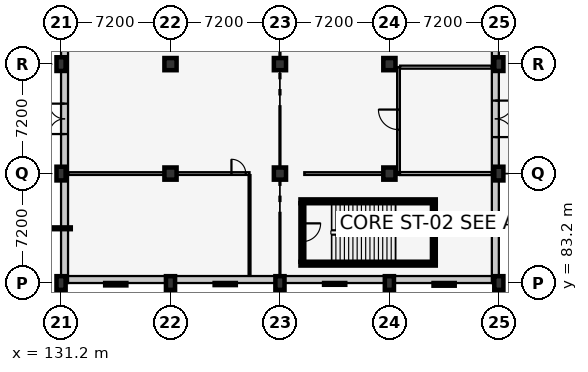
"""IFC4 building model, lengths in metres.
Left out: names, types, materials, properties, quantities, classifications, styles, units other than length and angle.
Written with IfcOpenShell. Run it as: python <this file> out.ifc"""

import sys

from ifc_helpers import new_model, si_unit, direction, frame, frame_2d, origin, origin_2d, place, context, subcontext, project, spatial, rectangle, extrude, element, fill, save


model = new_model("IFC4")
c1 = context("Model", 3, precision=1e-05, world=origin(), true_north=direction((0.0, 1.0)))
c2 = subcontext(c1, "Body", "Model", "MODEL_VIEW")
j1 = project(units=[si_unit("LENGTHUNIT", "METRE"), si_unit("PLANEANGLEUNIT", "RADIAN")], contexts=[c1])
p1 = place(None, origin())
s1 = spatial("IfcSite", under=j1, at=p1, CompositionType="ELEMENT")
p2 = place(p1, origin())
s2 = spatial("IfcBuilding", under=s1, at=p2, CompositionType="ELEMENT")
p3 = place(p2, origin())
s3 = spatial("IfcBuildingStorey", under=s2, at=p3, CompositionType="ELEMENT", Elevation=0.0)
for number, where, z_axis, x_axis in (
    (1, (131.2, 83.2, 0.0), (0.0, 0.0, 1.0), (1.0, 0.0, 0.0)),
    (2, (131.2, 90.4, 0.0), (0.0, 0.0, 1.0), (1.0, 0.0, 0.0)),
    (3, (131.2, 97.6, 0.0), (0.0, 0.0, 1.0), (1.0, 0.0, 0.0)),
    (4, (138.4, 83.2, 0.0), (0.0, 0.0, 1.0), (1.0, 0.0, 0.0)),
):
    element("IfcColumn", number, at=place(p3, frame(where, z_axis=z_axis, x_axis=x_axis)), inside=s3, PredefinedType="COLUMN", context=c2, shape_type="SweptSolid", body=[
        extrude(rectangle(XDim=0.6, YDim=0.9, at=origin_2d()), origin(), (0.0, 0.0, 1.0), 5.4),
    ])
for number, where, z_axis, x_axis in (
    (5, (138.4, 90.4, 0.0), (0.0, 0.0, 1.0), (1.0, 0.0, 0.0)),
    (6, (138.4, 97.6, 0.0), (0.0, 0.0, 1.0), (1.0, 0.0, 0.0)),
):
    element("IfcColumn", number, at=place(p3, frame(where, z_axis=z_axis, x_axis=x_axis)), inside=s3, PredefinedType="COLUMN", context=c2, shape_type="SweptSolid", body=[
        extrude(rectangle(XDim=0.8, YDim=0.8, at=origin_2d()), origin(), (0.0, 0.0, 1.0), 5.4),
    ])
p4 = place(p3, frame((145.6, 83.2, 0.0), z_axis=(0.0, 0.0, 1.0), x_axis=(1.0, 0.0, 0.0)))
e7 = element("IfcColumn", 7, at=p4, inside=s3, PredefinedType="COLUMN", context=c2, shape_type="SweptSolid", body=[
    extrude(rectangle(XDim=0.6, YDim=0.9, at=origin_2d()), origin(), (0.0, 0.0, 1.0), 5.4),
])
for number, where, z_axis, x_axis in (
    (8, (145.6, 90.4, 0.0), (0.0, 0.0, 1.0), (1.0, 0.0, 0.0)),
    (9, (145.6, 97.6, 0.0), (0.0, 0.0, 1.0), (1.0, 0.0, 0.0)),
):
    element("IfcColumn", number, at=place(p3, frame(where, z_axis=z_axis, x_axis=x_axis)), inside=s3, PredefinedType="COLUMN", context=c2, shape_type="SweptSolid", body=[
        extrude(rectangle(XDim=0.8, YDim=0.8, at=origin_2d()), origin(), (0.0, 0.0, 1.0), 5.4),
    ])
p5 = place(p3, frame((152.8, 83.2, 0.0), z_axis=(0.0, 0.0, 1.0), x_axis=(1.0, 0.0, 0.0)))
e10 = element("IfcColumn", 10, at=p5, inside=s3, PredefinedType="COLUMN", context=c2, shape_type="SweptSolid", body=[
    extrude(rectangle(XDim=0.6, YDim=0.9, at=origin_2d()), origin(), (0.0, 0.0, 1.0), 5.4),
])
for number, where, z_axis, x_axis in (
    (11, (152.8, 90.4, 0.0), (0.0, 0.0, 1.0), (1.0, 0.0, 0.0)),
    (12, (152.8, 97.6, 0.0), (0.0, 0.0, 1.0), (1.0, 0.0, 0.0)),
):
    element("IfcColumn", number, at=place(p3, frame(where, z_axis=z_axis, x_axis=x_axis)), inside=s3, PredefinedType="COLUMN", context=c2, shape_type="SweptSolid", body=[
        extrude(rectangle(XDim=0.8, YDim=0.8, at=origin_2d()), origin(), (0.0, 0.0, 1.0), 5.4),
    ])
for number, where, z_axis, x_axis in (
    (13, (160.0, 83.2, 0.0), (0.0, 0.0, 1.0), (1.0, 0.0, 0.0)),
    (14, (160.0, 90.4, 0.0), (0.0, 0.0, 1.0), (1.0, 0.0, 0.0)),
    (15, (160.0, 97.6, 0.0), (0.0, 0.0, 1.0), (1.0, 0.0, 0.0)),
):
    element("IfcColumn", number, at=place(p3, frame(where, z_axis=z_axis, x_axis=x_axis)), inside=s3, PredefinedType="COLUMN", context=c2, shape_type="SweptSolid", body=[
        extrude(rectangle(XDim=0.6, YDim=0.9, at=origin_2d()), origin(), (0.0, 0.0, 1.0), 5.4),
    ])
p6 = place(p3, frame((160.0, 83.43, 0.0), z_axis=(0.0, 0.0, 1.0), x_axis=(-1.0, 0.0, 0.0)))
e16 = element("IfcWall", 16, at=p6, inside=s3, PredefinedType="SOLIDWALL", context=c2, shape_type="SweptSolid", body=[
    extrude(rectangle(XDim=28.8, YDim=0.46, at=frame_2d((14.4, 0.0))), origin(), (0.0, 0.0, 1.0), 4.435),
])
p7 = place(p3, frame((159.77, 112.0, 0.0), z_axis=(0.0, 0.0, 1.0), x_axis=(0.0, -1.0, 0.0)))
e17 = element("IfcWall", 17, at=p7, inside=s3, PredefinedType="SOLIDWALL", context=c2, shape_type="SweptSolid", body=[
    extrude(rectangle(XDim=28.8, YDim=0.46, at=frame_2d((14.4, 0.0))), origin(), (0.0, 0.0, 1.0), 4.535),
])
p8 = place(p7, frame((16.8, 0.0, 0.0)))
e18 = element("IfcOpeningElement", 18, at=p8, cuts=e17, PredefinedType="OPENING", context=c2, shape_type="SweptSolid", body=[
    extrude(rectangle(XDim=2.4, YDim=2.4, at=frame_2d((1.2, 1.2))), frame((0.0, 0.242, 0.0), z_axis=(0.0, -1.0, 0.0), x_axis=(1.0, 0.0, 0.0)), (0.0, 0.0, 1.0), 0.484),
])
p9 = place(p3, frame((131.43, 83.2, 0.0), z_axis=(0.0, 0.0, 1.0), x_axis=(0.0, 1.0, 0.0)))
e19 = element("IfcWall", 19, at=p9, inside=s3, PredefinedType="SOLIDWALL", context=c2, shape_type="SweptSolid", body=[
    extrude(rectangle(XDim=28.8, YDim=0.46, at=frame_2d((14.4, 0.0))), origin(), (0.0, 0.0, 1.0), 4.535),
])
p10 = place(p9, frame((9.8, 0.0, 0.0)))
e20 = element("IfcOpeningElement", 20, at=p10, cuts=e19, PredefinedType="OPENING", context=c2, shape_type="SweptSolid", body=[
    extrude(rectangle(XDim=2.0, YDim=2.35, at=frame_2d((1.0, 1.175))), frame((0.0, 0.242, 0.0), z_axis=(0.0, -1.0, 0.0), x_axis=(1.0, 0.0, 0.0)), (0.0, 0.0, 1.0), 0.484),
])
for number, where, z_axis, x_axis in (
    (21, (146.95, 84.475, 0.0), (0.0, 0.0, 1.0), (1.0, 0.0, 0.0)),
    (22, (155.85, 88.575, 0.0), (0.0, 0.0, 1.0), (-1.0, 0.0, 0.0)),
):
    element("IfcWall", number, at=place(p3, frame(where, z_axis=z_axis, x_axis=x_axis)), inside=s3, PredefinedType="SHEAR", context=c2, shape_type="SweptSolid", body=[
        extrude(rectangle(XDim=8.9, YDim=0.25, at=frame_2d((4.45, 0.0))), origin(), (0.0, 0.0, 1.0), 5.14),
    ])
p11 = place(p3, frame((147.075, 88.45, 0.0), z_axis=(0.0, 0.0, 1.0), x_axis=(0.0, -1.0, 0.0)))
e23 = element("IfcWall", 23, at=p11, inside=s3, PredefinedType="SHEAR", context=c2, shape_type="SweptSolid", body=[
    extrude(rectangle(XDim=3.85, YDim=0.25, at=frame_2d((1.925, 0.0))), origin(), (0.0, 0.0, 1.0), 5.14),
])
p12 = place(p11, frame((1.325, 0.0, 0.0)))
e24 = element("IfcOpeningElement", 24, at=p12, cuts=e23, PredefinedType="OPENING", context=c2, shape_type="SweptSolid", body=[
    extrude(rectangle(XDim=1.2, YDim=2.15, at=frame_2d((0.6, 1.075))), frame((0.0, 0.137, 0.0), z_axis=(0.0, -1.0, 0.0), x_axis=(1.0, 0.0, 0.0)), (0.0, 0.0, 1.0), 0.274),
])
p13 = place(p3, frame((155.725, 84.6, 0.0), z_axis=(0.0, 0.0, 1.0), x_axis=(0.0, 1.0, 0.0)))
e25 = element("IfcWall", 25, at=p13, inside=s3, PredefinedType="SHEAR", context=c2, shape_type="SweptSolid", body=[
    extrude(rectangle(XDim=3.85, YDim=0.25, at=frame_2d((1.925, 0.0))), origin(), (0.0, 0.0, 1.0), 5.14),
])
p14 = place(p3, frame((131.67, 90.4, 0.0), z_axis=(0.0, 0.0, 1.0), x_axis=(1.0, 0.0, 0.0)))
e26 = element("IfcWall", 26, at=p14, inside=s3, PredefinedType="PARTITIONING", context=c2, shape_type="SweptSolid", body=[
    extrude(rectangle(XDim=11.93, YDim=0.18, at=frame_2d((5.965, 0.0))), origin(), (0.0, 0.0, 1.0), 4.265),
])
p15 = place(p14, frame((10.74, 0.0, 0.0)))
e27 = element("IfcOpeningElement", 27, at=p15, cuts=e26, PredefinedType="OPENING", context=c2, shape_type="SweptSolid", body=[
    extrude(rectangle(XDim=0.94, YDim=2.1, at=frame_2d((0.47, 1.05))), frame((0.0, 0.102, 0.0), z_axis=(0.0, -1.0, 0.0), x_axis=(1.0, 0.0, 0.0)), (0.0, 0.0, 1.0), 0.204),
])
p16 = place(p3, frame((147.2, 90.4, 0.0), z_axis=(0.0, 0.0, 1.0), x_axis=(1.0, 0.0, 0.0)))
e28 = element("IfcWall", 28, at=p16, inside=s3, PredefinedType="PARTITIONING", context=c2, shape_type="SweptSolid", body=[
    extrude(rectangle(XDim=6.2, YDim=0.18, at=frame_2d((3.1, 0.0))), origin(), (0.0, 0.0, 1.0), 4.365),
])
p17 = place(p3, frame((153.4, 90.5, 0.0), z_axis=(0.0, 0.0, 1.0), x_axis=(0.0, 1.0, 0.0)))
e29 = element("IfcWall", 29, at=p17, inside=s3, PredefinedType="PARTITIONING", context=c2, shape_type="SweptSolid", body=[
    extrude(rectangle(XDim=6.9, YDim=0.18, at=frame_2d((3.45, 0.0))), origin(), (0.0, 0.0, 1.0), 5.14),
])
p18 = place(p17, frame((2.79, 0.0, 0.0)))
e30 = element("IfcOpeningElement", 30, at=p18, cuts=e29, PredefinedType="OPENING", context=c2, shape_type="SweptSolid", body=[
    extrude(rectangle(XDim=1.32, YDim=2.15, at=frame_2d((0.66, 1.075))), frame((0.0, 0.102, 0.0), z_axis=(0.0, -1.0, 0.0), x_axis=(1.0, 0.0, 0.0)), (0.0, 0.0, 1.0), 0.204),
])
p19 = place(p3, frame((143.6, 83.67, 0.0), z_axis=(0.0, 0.0, 1.0), x_axis=(0.0, 1.0, 0.0)))
e31 = element("IfcWall", 31, at=p19, inside=s3, PredefinedType="PARTITIONING", context=c2, shape_type="SweptSolid", body=[
    extrude(rectangle(XDim=6.63, YDim=0.125, at=frame_2d((3.315, 0.0))), origin(), (0.0, 0.0, 1.0), 5.14),
])
for number, where, z_axis, x_axis in (
    (32, (153.5, 90.4, 0.0), (0.0, 0.0, 1.0), (1.0, 0.0, 0.0)),
    (33, (153.5, 97.4, 0.0), (0.0, 0.0, 1.0), (1.0, 0.0, 0.0)),
):
    element("IfcWall", number, at=place(p3, frame(where, z_axis=z_axis, x_axis=x_axis)), inside=s3, PredefinedType="PARTITIONING", context=c2, shape_type="SweptSolid", body=[
        extrude(rectangle(XDim=6.03, YDim=0.2, at=frame_2d((3.015, 0.0))), origin(), (0.0, 0.0, 1.0), 4.365),
    ])
p20 = place(p8, origin())
e34 = element("IfcDoor", 34, at=p20, inside=s3, OperationType="DOUBLE_DOOR_SINGLE_SWING", PredefinedType="DOOR", context=c2, shape_type="SweptSolid", body=[
    extrude(rectangle(XDim=2.4, YDim=2.4, at=frame_2d((1.2, 1.2))), frame((0.0, 0.025, 0.0), z_axis=(0.0, -1.0, 0.0), x_axis=(1.0, 0.0, 0.0)), (0.0, 0.0, 1.0), 0.05),
])
fill(e18, e34)
p21 = place(p10, origin())
e35 = element("IfcDoor", 35, at=p21, inside=s3, OperationType="DOUBLE_DOOR_SINGLE_SWING", PredefinedType="DOOR", context=c2, shape_type="SweptSolid", body=[
    extrude(rectangle(XDim=2.0, YDim=2.35, at=frame_2d((1.0, 1.175))), frame((0.0, 0.025, 0.0), z_axis=(0.0, -1.0, 0.0), x_axis=(1.0, 0.0, 0.0)), (0.0, 0.0, 1.0), 0.05),
])
fill(e20, e35)
p22 = place(p12, origin())
e36 = element("IfcDoor", 36, at=p22, inside=s3, OperationType="SINGLE_SWING_LEFT", PredefinedType="DOOR", context=c2, shape_type="SweptSolid", body=[
    extrude(rectangle(XDim=1.2, YDim=2.15, at=frame_2d((0.6, 1.075))), frame((0.0, 0.025, 0.0), z_axis=(0.0, -1.0, 0.0), x_axis=(1.0, 0.0, 0.0)), (0.0, 0.0, 1.0), 0.05),
])
fill(e24, e36)
p23 = place(p15, origin())
e37 = element("IfcDoor", 37, at=p23, inside=s3, OperationType="SINGLE_SWING_LEFT", PredefinedType="DOOR", context=c2, shape_type="SweptSolid", body=[
    extrude(rectangle(XDim=0.94, YDim=2.1, at=frame_2d((0.47, 1.05))), frame((0.0, 0.025, 0.0), z_axis=(0.0, -1.0, 0.0), x_axis=(1.0, 0.0, 0.0)), (0.0, 0.0, 1.0), 0.05),
])
fill(e27, e37)
p24 = place(p18, origin())
e38 = element("IfcDoor", 38, at=p24, inside=s3, OperationType="SINGLE_SWING_RIGHT", PredefinedType="DOOR", context=c2, shape_type="SweptSolid", body=[
    extrude(rectangle(XDim=1.32, YDim=2.15, at=frame_2d((0.66, 1.075))), frame((0.0, 0.025, 0.0), z_axis=(0.0, -1.0, 0.0), x_axis=(1.0, 0.0, 0.0)), (0.0, 0.0, 1.0), 0.05),
])
fill(e30, e38)
save(model, sys.argv[1])
